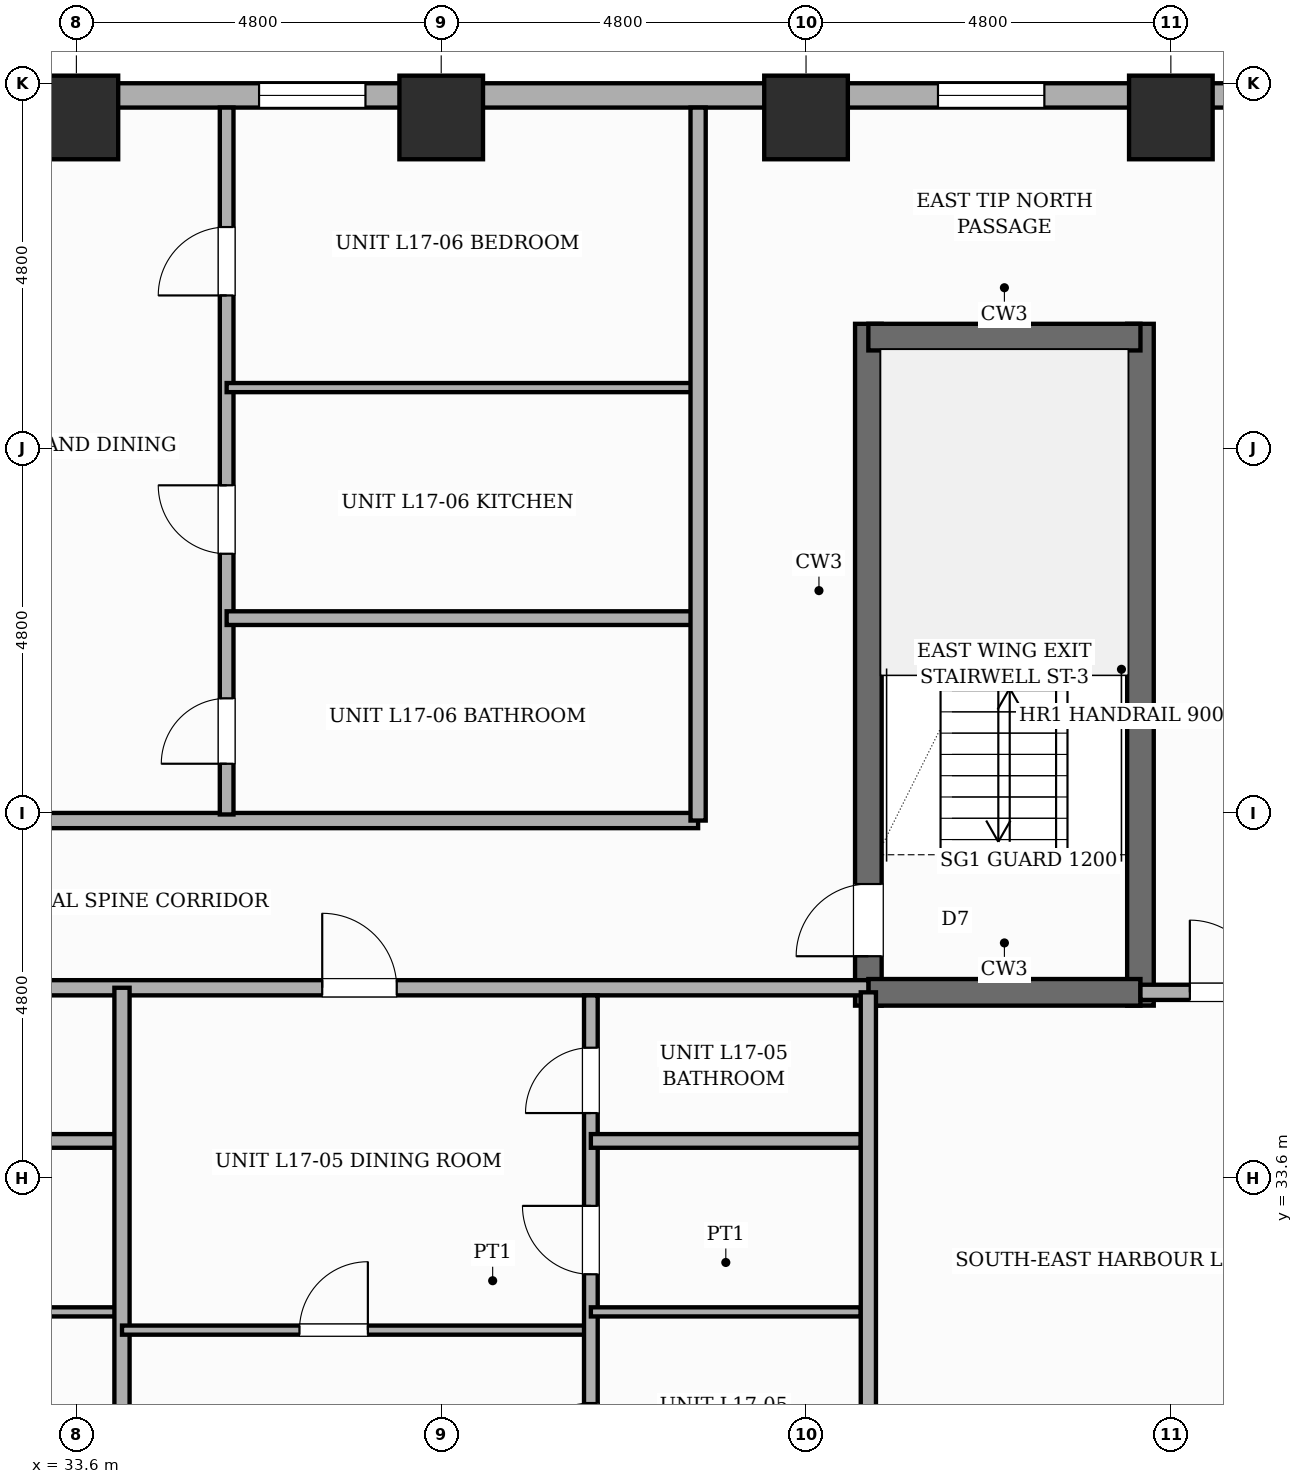
"""IFC4 building model, lengths in metres.
Left out: names, types, materials, properties, quantities, classifications, styles, units other than length and angle.
Written with IfcOpenShell. Run it as: python <this file> out.ifc"""

import sys

from ifc_helpers import new_model, si_unit, direction, frame, frame_2d, origin, origin_2d, place, context, subcontext, project, spatial, rectangle, extrude, element, fill, save


model = new_model("IFC4")
c1 = context("Model", 3, precision=1e-05, world=origin(), true_north=direction((0.0, 1.0)))
c2 = subcontext(c1, "Body", "Model", "MODEL_VIEW")
j1 = project(units=[si_unit("LENGTHUNIT", "METRE"), si_unit("PLANEANGLEUNIT", "RADIAN")], contexts=[c1])
p1 = place(None, origin())
s1 = spatial("IfcSite", under=j1, at=p1, CompositionType="ELEMENT")
p2 = place(p1, origin())
s2 = spatial("IfcBuilding", under=s1, at=p2, CompositionType="ELEMENT")
p3 = place(p2, frame((0.0, 0.0, 68.2)))
s3 = spatial("IfcBuildingStorey", under=s2, at=p3, CompositionType="ELEMENT", Elevation=68.2)
p4 = place(p3, frame((44.02, 35.865, 0.0), z_axis=(0.0, 0.0, 1.0), x_axis=(0.0, 1.0, 0.0)))
e1 = element("IfcWall", 1, at=p4, inside=s3, PredefinedType="SHEAR", context=c2, shape_type="SweptSolid", body=[
    extrude(rectangle(XDim=8.97, YDim=0.35, at=frame_2d((4.485, 0.0))), origin(), (0.0, 0.0, 1.0), 3.6),
])
p5 = place(p4, frame((0.65, 0.0, 0.0)))
e2 = element("IfcOpeningElement", 2, at=p5, cuts=e1, PredefinedType="OPENING", context=c2, shape_type="SweptSolid", body=[
    extrude(rectangle(XDim=0.95, YDim=2.1, at=frame_2d((0.475, 1.05))), frame((0.0, 0.185, 0.0), z_axis=(0.0, -1.0, 0.0), x_axis=(1.0, 0.0, 0.0)), (0.0, 0.0, 1.0), 0.37),
])
p6 = place(p3, frame((47.6, 35.865, 0.0), z_axis=(0.0, 0.0, 1.0), x_axis=(0.0, 1.0, 0.0)))
e3 = element("IfcWall", 3, at=p6, inside=s3, PredefinedType="SHEAR", context=c2, shape_type="SweptSolid", body=[
    extrude(rectangle(XDim=8.97, YDim=0.35, at=frame_2d((4.485, 0.0))), origin(), (0.0, 0.0, 1.0), 3.6),
])
for number, where, z_axis, x_axis in (
    (4, (44.02, 36.04, 0.0), (0.0, 0.0, 1.0), (1.0, 0.0, 0.0)),
    (5, (44.02, 44.66, 0.0), (0.0, 0.0, 1.0), (1.0, 0.0, 0.0)),
):
    element("IfcWall", number, at=place(p3, frame(where, z_axis=z_axis, x_axis=x_axis)), inside=s3, PredefinedType="SHEAR", context=c2, shape_type="SweptSolid", body=[
        extrude(rectangle(XDim=3.58, YDim=0.35, at=frame_2d((1.79, 0.0))), origin(), (0.0, 0.0, 1.0), 3.6),
    ])
for number, where, z_axis, x_axis in (
    (6, (33.6, 47.55, 0.0), (0.0, 0.0, 1.0), (1.0, 0.0, 0.0)),
    (7, (38.4, 47.55, 0.0), (0.0, 0.0, 1.0), (1.0, 0.0, 0.0)),
    (8, (43.2, 47.55, 0.0), (0.0, 0.0, 1.0), (1.0, 0.0, 0.0)),
    (9, (48.0, 47.55, 0.0), (0.0, 0.0, 1.0), (1.0, 0.0, 0.0)),
):
    element("IfcColumn", number, at=place(p3, frame(where, z_axis=z_axis, x_axis=x_axis)), inside=s3, PredefinedType="COLUMN", context=c2, shape_type="SweptSolid", body=[
        extrude(rectangle(XDim=1.1, YDim=1.1, at=origin_2d()), origin(), (0.0, 0.0, 1.0), 3.6),
    ])
p7 = place(p3, frame((7.2, 47.84, 0.0), z_axis=(0.0, 0.0, 1.0), x_axis=(1.0, 0.0, 0.0)))
e10 = element("IfcWall", 10, at=p7, inside=s3, PredefinedType="STANDARD", context=c2, shape_type="SweptSolid", body=[
    extrude(rectangle(XDim=48.0, YDim=0.32, at=frame_2d((24.0, 0.0))), origin(), (0.0, 0.0, 1.0), 2.53),
])
p8 = place(p7, frame((28.803, 0.0, 0.65)))
e11 = element("IfcOpeningElement", 11, at=p8, cuts=e10, PredefinedType="OPENING", context=c2, shape_type="SweptSolid", body=[
    extrude(rectangle(XDim=1.4, YDim=1.1, at=frame_2d((0.7, 0.55))), frame((0.0, 0.17, 0.0), z_axis=(0.0, -1.0, 0.0), x_axis=(1.0, 0.0, 0.0)), (0.0, 0.0, 1.0), 0.34),
])
p9 = place(p7, frame((47.094, 0.0, 0.45)))
e12 = element("IfcOpeningElement", 12, at=p9, cuts=e10, PredefinedType="OPENING", context=c2, shape_type="SweptSolid", body=[
    extrude(rectangle(XDim=0.6, YDim=1.8, at=frame_2d((0.3, 0.9))), frame((0.0, 0.17, 0.0), z_axis=(0.0, -1.0, 0.0), x_axis=(1.0, 0.0, 0.0)), (0.0, 0.0, 1.0), 0.34),
])
p10 = place(p7, frame((18.74, 0.0, 0.45)))
e13 = element("IfcOpeningElement", 13, at=p10, cuts=e10, PredefinedType="OPENING", context=c2, shape_type="SweptSolid", body=[
    extrude(rectangle(XDim=0.95, YDim=1.8, at=frame_2d((0.475, 0.9))), frame((0.0, 0.17, 0.0), z_axis=(0.0, -1.0, 0.0), x_axis=(1.0, 0.0, 0.0)), (0.0, 0.0, 1.0), 0.34),
])
p11 = place(p7, frame((41.65, 0.0, 0.45)))
e14 = element("IfcOpeningElement", 14, at=p11, cuts=e10, PredefinedType="OPENING", context=c2, shape_type="SweptSolid", body=[
    extrude(rectangle(XDim=0.75, YDim=1.8, at=frame_2d((0.375, 0.9))), frame((0.0, 0.17, 0.0), z_axis=(0.0, -1.0, 0.0), x_axis=(1.0, 0.0, 0.0)), (0.0, 0.0, 1.0), 0.34),
])
p12 = place(p7, frame((37.736, 0.0, 0.65)))
e15 = element("IfcOpeningElement", 15, at=p12, cuts=e10, PredefinedType="OPENING", context=c2, shape_type="SweptSolid", body=[
    extrude(rectangle(XDim=1.4, YDim=1.1, at=frame_2d((0.7, 0.55))), frame((0.0, 0.17, 0.0), z_axis=(0.0, -1.0, 0.0), x_axis=(1.0, 0.0, 0.0)), (0.0, 0.0, 1.0), 0.34),
])
p13 = place(p7, frame((0.47, 0.0, 0.45)))
e16 = element("IfcOpeningElement", 16, at=p13, cuts=e10, PredefinedType="OPENING", context=c2, shape_type="SweptSolid", body=[
    extrude(rectangle(XDim=0.95, YDim=1.8, at=frame_2d((0.475, 0.9))), frame((0.0, 0.17, 0.0), z_axis=(0.0, -1.0, 0.0), x_axis=(1.0, 0.0, 0.0)), (0.0, 0.0, 1.0), 0.34),
])
p14 = place(p7, frame((10.215, 0.0, 0.45)))
e17 = element("IfcOpeningElement", 17, at=p14, cuts=e10, PredefinedType="OPENING", context=c2, shape_type="SweptSolid", body=[
    extrude(rectangle(XDim=0.95, YDim=1.8, at=frame_2d((0.475, 0.9))), frame((0.0, 0.17, 0.0), z_axis=(0.0, -1.0, 0.0), x_axis=(1.0, 0.0, 0.0)), (0.0, 0.0, 1.0), 0.34),
])
p15 = place(p7, frame((23.43, 0.0, 0.65)))
e18 = element("IfcOpeningElement", 18, at=p15, cuts=e10, PredefinedType="OPENING", context=c2, shape_type="SweptSolid", body=[
    extrude(rectangle(XDim=1.4, YDim=1.1, at=frame_2d((0.7, 0.55))), frame((0.0, 0.17, 0.0), z_axis=(0.0, -1.0, 0.0), x_axis=(1.0, 0.0, 0.0)), (0.0, 0.0, 1.0), 0.34),
])
p16 = place(p7, frame((42.95, 0.0, 0.65)))
e19 = element("IfcOpeningElement", 19, at=p16, cuts=e10, PredefinedType="OPENING", context=c2, shape_type="SweptSolid", body=[
    extrude(rectangle(XDim=1.4, YDim=1.1, at=frame_2d((0.7, 0.55))), frame((0.0, 0.17, 0.0), z_axis=(0.0, -1.0, 0.0), x_axis=(1.0, 0.0, 0.0)), (0.0, 0.0, 1.0), 0.34),
])
p17 = place(p7, frame((45.984, 0.0, 0.45)))
e20 = element("IfcOpeningElement", 20, at=p17, cuts=e10, PredefinedType="OPENING", context=c2, shape_type="SweptSolid", body=[
    extrude(rectangle(XDim=0.6, YDim=1.8, at=frame_2d((0.3, 0.9))), frame((0.0, 0.17, 0.0), z_axis=(0.0, -1.0, 0.0), x_axis=(1.0, 0.0, 0.0)), (0.0, 0.0, 1.0), 0.34),
])
p18 = place(p3, frame((22.75, 36.1, 0.0), z_axis=(0.0, 0.0, 1.0), x_axis=(1.0, 0.0, 0.0)))
e21 = element("IfcWall", 21, at=p18, inside=s3, PredefinedType="PARTITIONING", context=c2, shape_type="SweptSolid", body=[
    extrude(rectangle(XDim=21.27, YDim=0.2, at=frame_2d((10.635, 0.0))), origin(), (0.0, 0.0, 1.0), 3.35),
])
p19 = place(p18, frame((1.625, 0.0, 0.0)))
e22 = element("IfcOpeningElement", 22, at=p19, cuts=e21, PredefinedType="OPENING", context=c2, shape_type="SweptSolid", body=[
    extrude(rectangle(XDim=0.98, YDim=2.18, at=frame_2d((0.49, 1.09))), frame((0.0, 0.11, 0.0), z_axis=(0.0, -1.0, 0.0), x_axis=(1.0, 0.0, 0.0)), (0.0, 0.0, 1.0), 0.22),
])
p20 = place(p18, frame((14.084, 0.0, 0.0)))
e23 = element("IfcOpeningElement", 23, at=p20, cuts=e21, PredefinedType="OPENING", context=c2, shape_type="SweptSolid", body=[
    extrude(rectangle(XDim=0.98, YDim=2.18, at=frame_2d((0.49, 1.09))), frame((0.0, 0.11, 0.0), z_axis=(0.0, -1.0, 0.0), x_axis=(1.0, 0.0, 0.0)), (0.0, 0.0, 1.0), 0.22),
])
p21 = place(p3, frame((27.35, 38.3, 0.0), z_axis=(0.0, 0.0, 1.0), x_axis=(1.0, 0.0, 0.0)))
e24 = element("IfcWall", 24, at=p21, inside=s3, PredefinedType="PARTITIONING", context=c2, shape_type="SweptSolid", body=[
    extrude(rectangle(XDim=14.43, YDim=0.2, at=frame_2d((7.215, 0.0))), origin(), (0.0, 0.0, 1.0), 3.35),
])
p22 = place(p21, frame((4.803, 0.0, 0.0)))
e25 = element("IfcOpeningElement", 25, at=p22, cuts=e24, PredefinedType="OPENING", context=c2, shape_type="SweptSolid", body=[
    extrude(rectangle(XDim=0.98, YDim=2.18, at=frame_2d((0.49, 1.09))), frame((0.0, 0.11, 0.0), z_axis=(0.0, -1.0, 0.0), x_axis=(1.0, 0.0, 0.0)), (0.0, 0.0, 1.0), 0.22),
])
p23 = place(p3, frame((26.801, 31.836, 0.0), z_axis=(0.0, 0.0, 1.0), x_axis=(1.0, 0.0, 0.0)))
e26 = element("IfcWall", 26, at=p23, inside=s3, PredefinedType="PARTITIONING", context=c2, shape_type="SweptSolid", body=[
    extrude(rectangle(XDim=7.399, YDim=0.12, at=frame_2d((3.699, 0.0))), origin(), (0.0, 0.0, 1.0), 3.35),
])
p24 = place(p3, frame((26.801, 34.085, 0.0), z_axis=(0.0, 0.0, 1.0), x_axis=(1.0, 0.0, 0.0)))
e27 = element("IfcWall", 27, at=p24, inside=s3, PredefinedType="PLUMBINGWALL", context=c2, shape_type="SweptSolid", body=[
    extrude(rectangle(XDim=7.399, YDim=0.18, at=frame_2d((3.699, 0.0))), origin(), (0.0, 0.0, 1.0), 3.35),
])
p25 = place(p3, frame((34.2, 29.12, 0.0), z_axis=(0.0, 0.0, 1.0), x_axis=(0.0, 1.0, 0.0)))
e28 = element("IfcWall", 28, at=p25, inside=s3, PredefinedType="SOLIDWALL", context=c2, shape_type="SweptSolid", body=[
    extrude(rectangle(XDim=6.98, YDim=0.2, at=frame_2d((3.49, 0.0))), origin(), (0.0, 0.0, 1.0), 3.35),
])
p26 = place(p3, frame((34.2, 31.596, 0.0), z_axis=(0.0, 0.0, 1.0), x_axis=(1.0, 0.0, 0.0)))
e29 = element("IfcWall", 29, at=p26, inside=s3, PredefinedType="PARTITIONING", context=c2, shape_type="SweptSolid", body=[
    extrude(rectangle(XDim=6.169, YDim=0.12, at=frame_2d((3.084, 0.0))), origin(), (0.0, 0.0, 1.0), 3.35),
])
p27 = place(p26, frame((2.335, 0.0, 0.0)))
e30 = element("IfcOpeningElement", 30, at=p27, cuts=e29, PredefinedType="OPENING", context=c2, shape_type="SweptSolid", body=[
    extrude(rectangle(XDim=0.9, YDim=2.15, at=frame_2d((0.45, 1.075))), frame((0.0, 0.07, 0.0), z_axis=(0.0, -1.0, 0.0), x_axis=(1.0, 0.0, 0.0)), (0.0, 0.0, 1.0), 0.14),
])
p28 = place(p3, frame((40.369, 29.12, 0.0), z_axis=(0.0, 0.0, 1.0), x_axis=(0.0, 1.0, 0.0)))
e31 = element("IfcWall", 31, at=p28, inside=s3, PredefinedType="PLUMBINGWALL", context=c2, shape_type="SweptSolid", body=[
    extrude(rectangle(XDim=6.88, YDim=0.18, at=frame_2d((3.44, 0.0))), origin(), (0.0, 0.0, 1.0), 3.35),
])
p29 = place(p28, frame((0.617, 0.0, 0.0)))
e32 = element("IfcOpeningElement", 32, at=p29, cuts=e31, PredefinedType="OPENING", context=c2, shape_type="SweptSolid", body=[
    extrude(rectangle(XDim=0.9, YDim=2.15, at=frame_2d((0.45, 1.075))), frame((0.0, 0.1, 0.0), z_axis=(0.0, -1.0, 0.0), x_axis=(1.0, 0.0, 0.0)), (0.0, 0.0, 1.0), 0.2),
])
p30 = place(p28, frame((3.21, 0.0, 0.0)))
e33 = element("IfcOpeningElement", 33, at=p30, cuts=e31, PredefinedType="OPENING", context=c2, shape_type="SweptSolid", body=[
    extrude(rectangle(XDim=0.9, YDim=2.15, at=frame_2d((0.45, 1.075))), frame((0.0, 0.1, 0.0), z_axis=(0.0, -1.0, 0.0), x_axis=(1.0, 0.0, 0.0)), (0.0, 0.0, 1.0), 0.2),
])
p31 = place(p28, frame((5.332, 0.0, 0.0)))
e34 = element("IfcOpeningElement", 34, at=p31, cuts=e31, PredefinedType="OPENING", context=c2, shape_type="SweptSolid", body=[
    extrude(rectangle(XDim=0.86, YDim=2.1, at=frame_2d((0.43, 1.05))), frame((0.0, 0.1, 0.0), z_axis=(0.0, -1.0, 0.0), x_axis=(1.0, 0.0, 0.0)), (0.0, 0.0, 1.0), 0.2),
])
p32 = place(p3, frame((40.369, 31.836, 0.0), z_axis=(0.0, 0.0, 1.0), x_axis=(1.0, 0.0, 0.0)))
e35 = element("IfcWall", 35, at=p32, inside=s3, PredefinedType="PARTITIONING", context=c2, shape_type="SweptSolid", body=[
    extrude(rectangle(XDim=3.551, YDim=0.12, at=frame_2d((1.775, 0.0))), origin(), (0.0, 0.0, 1.0), 3.35),
])
p33 = place(p3, frame((40.369, 34.085, 0.0), z_axis=(0.0, 0.0, 1.0), x_axis=(1.0, 0.0, 0.0)))
e36 = element("IfcWall", 36, at=p33, inside=s3, PredefinedType="PLUMBINGWALL", context=c2, shape_type="SweptSolid", body=[
    extrude(rectangle(XDim=3.551, YDim=0.18, at=frame_2d((1.775, 0.0))), origin(), (0.0, 0.0, 1.0), 3.35),
])
p34 = place(p3, frame((35.577, 38.38, 0.0), z_axis=(0.0, 0.0, 1.0), x_axis=(0.0, 1.0, 0.0)))
e37 = element("IfcWall", 37, at=p34, inside=s3, PredefinedType="PLUMBINGWALL", context=c2, shape_type="SweptSolid", body=[
    extrude(rectangle(XDim=9.3, YDim=0.18, at=frame_2d((4.65, 0.0))), origin(), (0.0, 0.0, 1.0), 3.35),
])
p35 = place(p34, frame((0.667, 0.0, 0.0)))
e38 = element("IfcOpeningElement", 38, at=p35, cuts=e37, PredefinedType="OPENING", context=c2, shape_type="SweptSolid", body=[
    extrude(rectangle(XDim=0.86, YDim=2.1, at=frame_2d((0.43, 1.05))), frame((0.0, 0.1, 0.0), z_axis=(0.0, -1.0, 0.0), x_axis=(1.0, 0.0, 0.0)), (0.0, 0.0, 1.0), 0.2),
])
p36 = place(p34, frame((3.43, 0.0, 0.0)))
e39 = element("IfcOpeningElement", 39, at=p36, cuts=e37, PredefinedType="OPENING", context=c2, shape_type="SweptSolid", body=[
    extrude(rectangle(XDim=0.9, YDim=2.15, at=frame_2d((0.45, 1.075))), frame((0.0, 0.1, 0.0), z_axis=(0.0, -1.0, 0.0), x_axis=(1.0, 0.0, 0.0)), (0.0, 0.0, 1.0), 0.2),
])
p37 = place(p34, frame((6.828, 0.0, 0.0)))
e40 = element("IfcOpeningElement", 40, at=p37, cuts=e37, PredefinedType="OPENING", context=c2, shape_type="SweptSolid", body=[
    extrude(rectangle(XDim=0.9, YDim=2.15, at=frame_2d((0.45, 1.075))), frame((0.0, 0.1, 0.0), z_axis=(0.0, -1.0, 0.0), x_axis=(1.0, 0.0, 0.0)), (0.0, 0.0, 1.0), 0.2),
])
p38 = place(p3, frame((35.577, 40.963, 0.0), z_axis=(0.0, 0.0, 1.0), x_axis=(1.0, 0.0, 0.0)))
e41 = element("IfcWall", 41, at=p38, inside=s3, PredefinedType="PLUMBINGWALL", context=c2, shape_type="SweptSolid", body=[
    extrude(rectangle(XDim=6.123, YDim=0.18, at=frame_2d((3.062, 0.0))), origin(), (0.0, 0.0, 1.0), 3.35),
])
p39 = place(p3, frame((35.577, 43.996, 0.0), z_axis=(0.0, 0.0, 1.0), x_axis=(1.0, 0.0, 0.0)))
e42 = element("IfcWall", 42, at=p39, inside=s3, PredefinedType="PARTITIONING", context=c2, shape_type="SweptSolid", body=[
    extrude(rectangle(XDim=6.123, YDim=0.12, at=frame_2d((3.062, 0.0))), origin(), (0.0, 0.0, 1.0), 3.35),
])
p40 = place(p3, frame((41.78, 38.3, 0.0), z_axis=(0.0, 0.0, 1.0), x_axis=(0.0, 1.0, 0.0)))
e43 = element("IfcWall", 43, at=p40, inside=s3, PredefinedType="PARTITIONING", context=c2, shape_type="SweptSolid", body=[
    extrude(rectangle(XDim=9.38, YDim=0.2, at=frame_2d((4.69, 0.0))), origin(), (0.0, 0.0, 1.0), 3.35),
])
p41 = place(p3, frame((47.6, 36.04, 0.0), z_axis=(0.0, 0.0, 1.0), x_axis=(1.0, 0.0, 0.0)))
e44 = element("IfcWall", 44, at=p41, inside=s3, PredefinedType="PARTITIONING", context=c2, shape_type="SweptSolid", body=[
    extrude(rectangle(XDim=2.3, YDim=0.2, at=frame_2d((1.15, 0.0))), origin(), (0.0, 0.0, 1.0), 3.35),
])
p42 = place(p41, frame((0.65, 0.0, 0.0)))
e45 = element("IfcOpeningElement", 45, at=p42, cuts=e44, PredefinedType="OPENING", context=c2, shape_type="SweptSolid", body=[
    extrude(rectangle(XDim=0.95, YDim=2.15, at=frame_2d((0.475, 1.075))), frame((0.0, 0.11, 0.0), z_axis=(0.0, -1.0, 0.0), x_axis=(1.0, 0.0, 0.0)), (0.0, 0.0, 1.0), 0.22),
])
p43 = place(p3, frame((44.02, 29.12, 0.0), z_axis=(0.0, 0.0, 1.0), x_axis=(0.0, 1.0, 0.0)))
e46 = element("IfcWall", 46, at=p43, inside=s3, PredefinedType="SOLIDWALL", context=c2, shape_type="SweptSolid", body=[
    extrude(rectangle(XDim=6.92, YDim=0.2, at=frame_2d((3.46, 0.0))), origin(), (0.0, 0.0, 1.0), 3.35),
])
p44 = place(p8, origin())
e47 = element("IfcWindow", 47, at=p44, inside=s3, PartitioningType="SINGLE_PANEL", PredefinedType="WINDOW", context=c2, shape_type="SweptSolid", body=[
    extrude(rectangle(XDim=1.4, YDim=1.1, at=frame_2d((0.7, 0.55))), frame((0.0, 0.03, 0.0), z_axis=(0.0, -1.0, 0.0), x_axis=(1.0, 0.0, 0.0)), (0.0, 0.0, 1.0), 0.06),
])
fill(e11, e47)
p45 = place(p12, origin())
e48 = element("IfcWindow", 48, at=p45, inside=s3, PartitioningType="SINGLE_PANEL", PredefinedType="WINDOW", context=c2, shape_type="SweptSolid", body=[
    extrude(rectangle(XDim=1.4, YDim=1.1, at=frame_2d((0.7, 0.55))), frame((0.0, 0.03, 0.0), z_axis=(0.0, -1.0, 0.0), x_axis=(1.0, 0.0, 0.0)), (0.0, 0.0, 1.0), 0.06),
])
fill(e15, e48)
p46 = place(p5, origin())
e49 = element("IfcDoor", 49, at=p46, inside=s3, OperationType="SINGLE_SWING_LEFT", PredefinedType="DOOR", context=c2, shape_type="SweptSolid", body=[
    extrude(rectangle(XDim=0.95, YDim=2.1, at=frame_2d((0.475, 1.05))), frame((0.0, 0.025, 0.0), z_axis=(0.0, -1.0, 0.0), x_axis=(1.0, 0.0, 0.0)), (0.0, 0.0, 1.0), 0.05),
])
fill(e2, e49)
p47 = place(p20, origin())
e50 = element("IfcDoor", 50, at=p47, inside=s3, OperationType="SINGLE_SWING_LEFT", PredefinedType="DOOR", context=c2, shape_type="SweptSolid", body=[
    extrude(rectangle(XDim=0.98, YDim=2.18, at=frame_2d((0.49, 1.09))), frame((0.0, 0.025, 0.0), z_axis=(0.0, -1.0, 0.0), x_axis=(1.0, 0.0, 0.0)), (0.0, 0.0, 1.0), 0.05),
])
fill(e23, e50)
p48 = place(p27, origin())
e51 = element("IfcDoor", 51, at=p48, inside=s3, OperationType="SINGLE_SWING_RIGHT", PredefinedType="DOOR", context=c2, shape_type="SweptSolid", body=[
    extrude(rectangle(XDim=0.9, YDim=2.15, at=frame_2d((0.45, 1.075))), frame((0.0, 0.025, 0.0), z_axis=(0.0, -1.0, 0.0), x_axis=(1.0, 0.0, 0.0)), (0.0, 0.0, 1.0), 0.05),
])
fill(e30, e51)
p49 = place(p29, origin())
e52 = element("IfcDoor", 52, at=p49, inside=s3, OperationType="SINGLE_SWING_LEFT", PredefinedType="DOOR", context=c2, shape_type="SweptSolid", body=[
    extrude(rectangle(XDim=0.9, YDim=2.15, at=frame_2d((0.45, 1.075))), frame((0.0, 0.025, 0.0), z_axis=(0.0, -1.0, 0.0), x_axis=(1.0, 0.0, 0.0)), (0.0, 0.0, 1.0), 0.05),
])
fill(e32, e52)
p50 = place(p30, origin())
e53 = element("IfcDoor", 53, at=p50, inside=s3, OperationType="SINGLE_SWING_RIGHT", PredefinedType="DOOR", context=c2, shape_type="SweptSolid", body=[
    extrude(rectangle(XDim=0.9, YDim=2.15, at=frame_2d((0.45, 1.075))), frame((0.0, 0.025, 0.0), z_axis=(0.0, -1.0, 0.0), x_axis=(1.0, 0.0, 0.0)), (0.0, 0.0, 1.0), 0.05),
])
fill(e33, e53)
p51 = place(p31, origin())
e54 = element("IfcDoor", 54, at=p51, inside=s3, OperationType="SINGLE_SWING_LEFT", PredefinedType="DOOR", context=c2, shape_type="SweptSolid", body=[
    extrude(rectangle(XDim=0.86, YDim=2.1, at=frame_2d((0.43, 1.05))), frame((0.0, 0.025, 0.0), z_axis=(0.0, -1.0, 0.0), x_axis=(1.0, 0.0, 0.0)), (0.0, 0.0, 1.0), 0.05),
])
fill(e34, e54)
p52 = place(p35, origin())
e55 = element("IfcDoor", 55, at=p52, inside=s3, OperationType="SINGLE_SWING_LEFT", PredefinedType="DOOR", context=c2, shape_type="SweptSolid", body=[
    extrude(rectangle(XDim=0.86, YDim=2.1, at=frame_2d((0.43, 1.05))), frame((0.0, 0.025, 0.0), z_axis=(0.0, -1.0, 0.0), x_axis=(1.0, 0.0, 0.0)), (0.0, 0.0, 1.0), 0.05),
])
fill(e38, e55)
p53 = place(p36, origin())
e56 = element("IfcDoor", 56, at=p53, inside=s3, OperationType="SINGLE_SWING_RIGHT", PredefinedType="DOOR", context=c2, shape_type="SweptSolid", body=[
    extrude(rectangle(XDim=0.9, YDim=2.15, at=frame_2d((0.45, 1.075))), frame((0.0, 0.025, 0.0), z_axis=(0.0, -1.0, 0.0), x_axis=(1.0, 0.0, 0.0)), (0.0, 0.0, 1.0), 0.05),
])
fill(e39, e56)
p54 = place(p37, origin())
e57 = element("IfcDoor", 57, at=p54, inside=s3, OperationType="SINGLE_SWING_LEFT", PredefinedType="DOOR", context=c2, shape_type="SweptSolid", body=[
    extrude(rectangle(XDim=0.9, YDim=2.15, at=frame_2d((0.45, 1.075))), frame((0.0, 0.025, 0.0), z_axis=(0.0, -1.0, 0.0), x_axis=(1.0, 0.0, 0.0)), (0.0, 0.0, 1.0), 0.05),
])
fill(e40, e57)
p55 = place(p42, origin())
e58 = element("IfcDoor", 58, at=p55, inside=s3, OperationType="SINGLE_SWING_LEFT", PredefinedType="DOOR", context=c2, shape_type="SweptSolid", body=[
    extrude(rectangle(XDim=0.95, YDim=2.15, at=frame_2d((0.475, 1.075))), frame((0.0, 0.025, 0.0), z_axis=(0.0, -1.0, 0.0), x_axis=(1.0, 0.0, 0.0)), (0.0, 0.0, 1.0), 0.05),
])
fill(e45, e58)
save(model, sys.argv[1])
